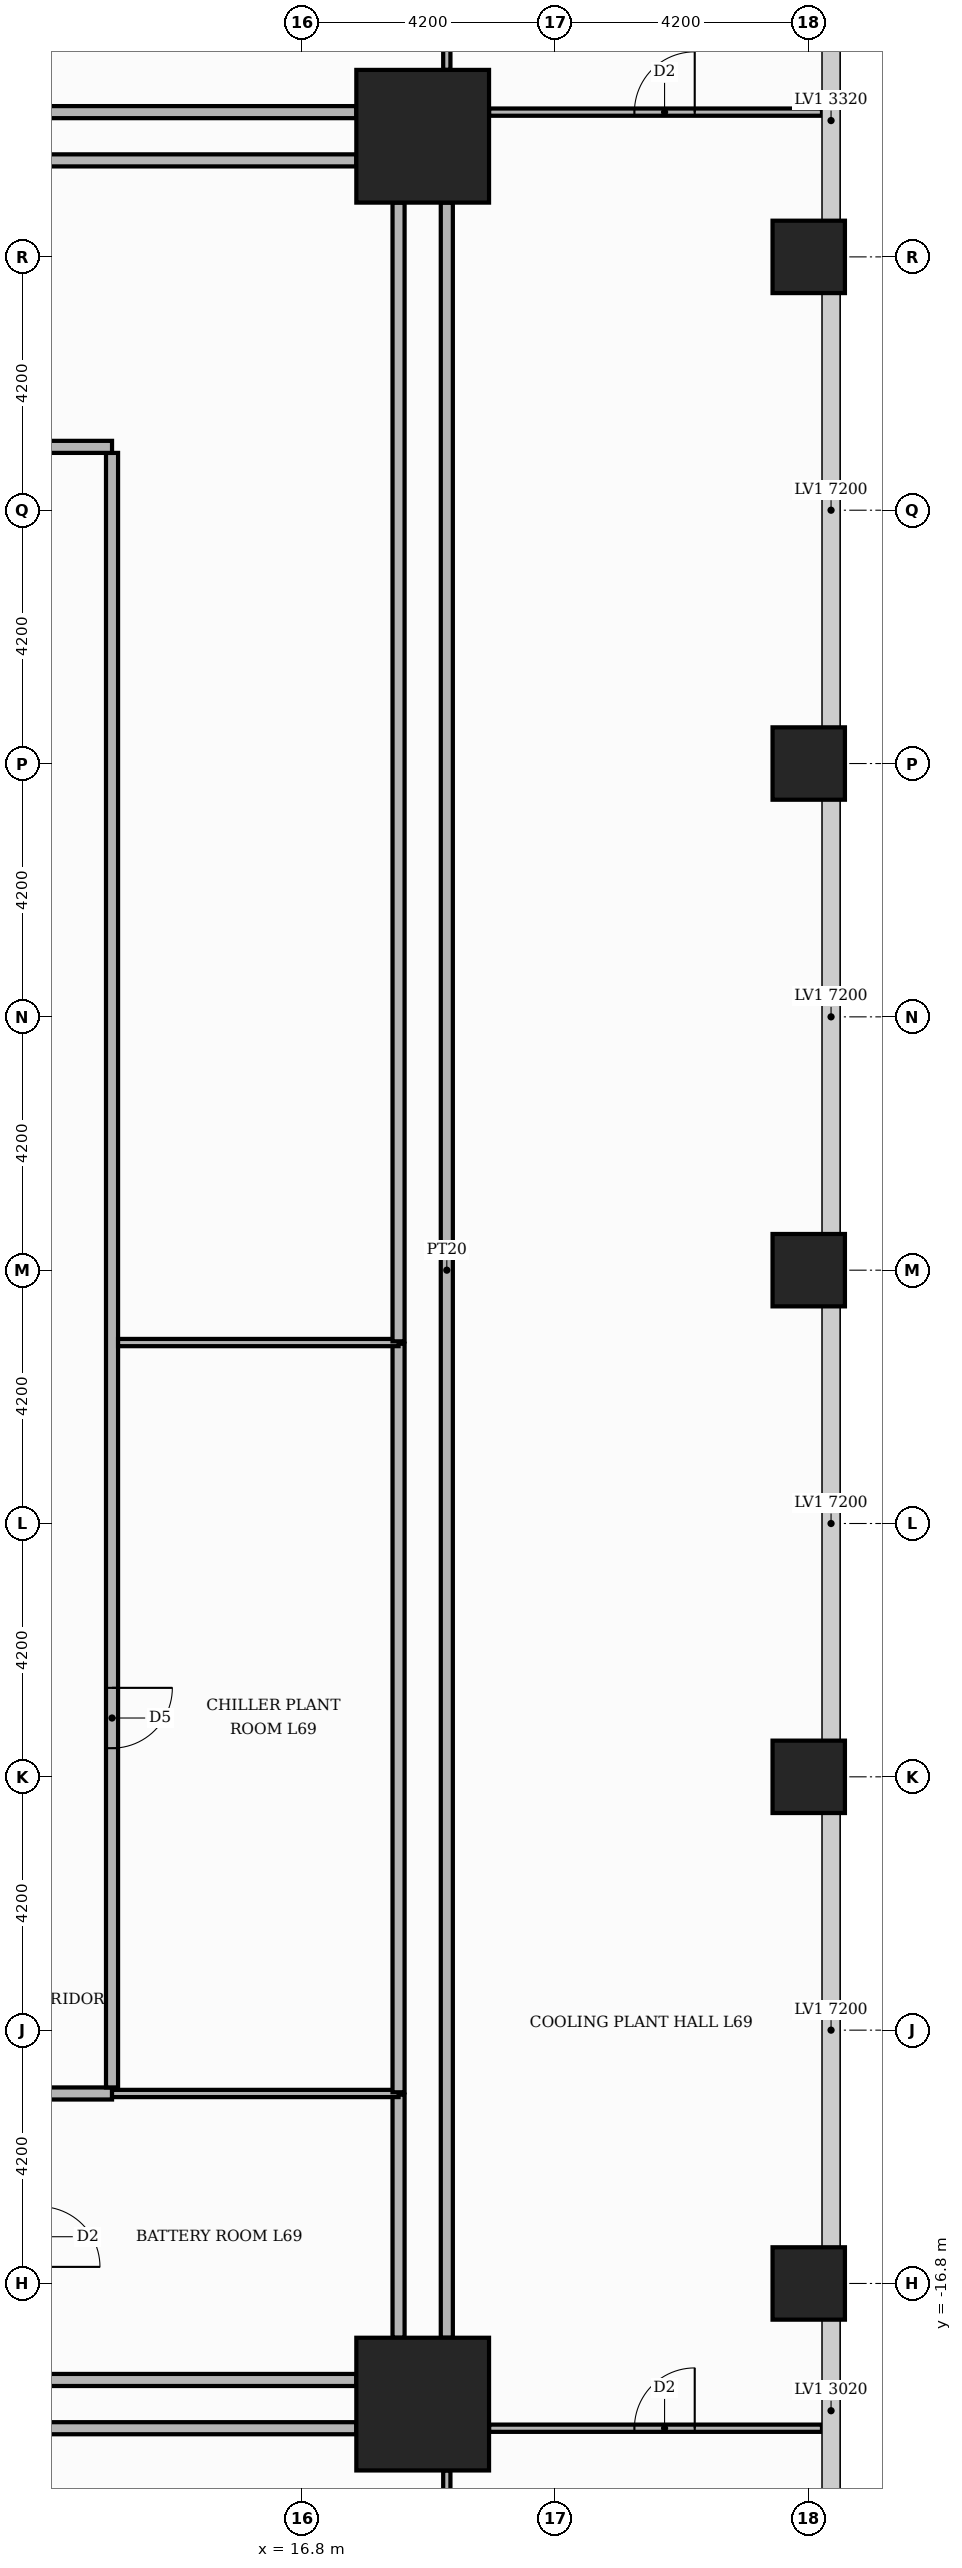
"""IFC4 building model, lengths in metres.
Left out: names, types, materials, properties, quantities, classifications, styles, units other than length and angle.
Written with IfcOpenShell. Run it as: python <this file> out.ifc"""

import sys

from ifc_helpers import new_model, si_unit, direction, frame, frame_2d, origin, origin_2d, place, context, subcontext, project, spatial, rectangle, extrude, element, fill, save


model = new_model("IFC4")
c1 = context("Model", 3, precision=1e-05, world=origin(), true_north=direction((0.0, 1.0)))
c2 = subcontext(c1, "Body", "Model", "MODEL_VIEW")
j1 = project(units=[si_unit("LENGTHUNIT", "METRE"), si_unit("PLANEANGLEUNIT", "RADIAN")], contexts=[c1])
p1 = place(None, origin())
s1 = spatial("IfcSite", under=j1, at=p1, CompositionType="ELEMENT")
p2 = place(p1, origin())
s2 = spatial("IfcBuilding", under=s1, at=p2, CompositionType="ELEMENT")
p3 = place(p2, frame((0.0, 0.0, 287.4)))
s3 = spatial("IfcBuildingStorey", under=s2, at=p3, CompositionType="ELEMENT", Elevation=287.4)
for number, where, z_axis, x_axis in (
    (1, (18.8, 18.8, 0.0), (0.0, 0.0, 1.0), (1.0, 0.0, 0.0)),
    (2, (18.8, -18.8, 0.0), (0.0, 0.0, 1.0), (1.0, 0.0, 0.0)),
):
    element("IfcColumn", number, at=place(p3, frame(where, z_axis=z_axis, x_axis=x_axis)), inside=s3, PredefinedType="COLUMN", context=c2, shape_type="SweptSolid", body=[
        extrude(rectangle(XDim=2.2, YDim=2.2, at=origin_2d()), origin(), (0.0, 0.0, 1.0), 5.4),
    ])
for number, where, z_axis, x_axis in (
    (3, (25.2, 0.0, 0.0), (0.0, 0.0, 1.0), (1.0, 0.0, 0.0)),
    (4, (25.2, 8.4, 0.0), (0.0, 0.0, 1.0), (1.0, 0.0, 0.0)),
    (5, (25.2, 16.8, 0.0), (0.0, 0.0, 1.0), (1.0, 0.0, 0.0)),
    (6, (25.2, -8.4, 0.0), (0.0, 0.0, 1.0), (1.0, 0.0, 0.0)),
    (7, (25.2, -16.8, 0.0), (0.0, 0.0, 1.0), (1.0, 0.0, 0.0)),
):
    element("IfcColumn", number, at=place(p3, frame(where, z_axis=z_axis, x_axis=x_axis)), inside=s3, PredefinedType="COLUMN", context=c2, shape_type="SweptSolid", body=[
        extrude(rectangle(XDim=1.2, YDim=1.2, at=origin_2d()), origin(), (0.0, 0.0, 1.0), 5.4),
    ])
p4 = place(p3, frame((19.2, -25.42, 0.0), z_axis=(0.0, 0.0, 1.0), x_axis=(0.0, 1.0, 0.0)))
e8 = element("IfcWall", 8, at=p4, inside=s3, PredefinedType="PARTITIONING", context=c2, shape_type="SweptSolid", body=[
    extrude(rectangle(XDim=5.52, YDim=0.12, at=frame_2d((2.76, 0.0))), origin(), (0.0, 0.0, 1.0), 5.05),
])
p5 = place(p4, frame((2.11, 0.0, 0.0)))
e9 = element("IfcOpeningElement", 9, at=p5, cuts=e8, PredefinedType="OPENING", context=c2, shape_type="SweptSolid", body=[
    extrude(rectangle(XDim=1.0, YDim=2.1, at=frame_2d((0.5, 1.05))), frame((0.0, 0.07, 0.0), z_axis=(0.0, -1.0, 0.0), x_axis=(1.0, 0.0, 0.0)), (0.0, 0.0, 1.0), 0.14),
])
p6 = place(p3, frame((-17.7, -19.2, 0.0), z_axis=(0.0, 0.0, 1.0), x_axis=(1.0, 0.0, 0.0)))
e10 = element("IfcWall", 10, at=p6, inside=s3, PredefinedType="PARTITIONING", context=c2, shape_type="SweptSolid", body=[
    extrude(rectangle(XDim=35.4, YDim=0.2, at=frame_2d((17.7, 0.0))), origin(), (0.0, 0.0, 1.0), 5.05),
])
p7 = place(p6, frame((17.2, 0.0, 0.0)))
e11 = element("IfcOpeningElement", 11, at=p7, cuts=e10, PredefinedType="OPENING", context=c2, shape_type="SweptSolid", body=[
    extrude(rectangle(XDim=1.0, YDim=2.1, at=frame_2d((0.5, 1.05))), frame((0.0, 0.11, 0.0), z_axis=(0.0, -1.0, 0.0), x_axis=(1.0, 0.0, 0.0)), (0.0, 0.0, 1.0), 0.22),
])
p8 = place(p3, frame((19.9, -19.2, 0.0), z_axis=(0.0, 0.0, 1.0), x_axis=(1.0, 0.0, 0.0)))
e12 = element("IfcWall", 12, at=p8, inside=s3, PredefinedType="PARTITIONING", context=c2, shape_type="SweptSolid", body=[
    extrude(rectangle(XDim=5.52, YDim=0.12, at=frame_2d((2.76, 0.0))), origin(), (0.0, 0.0, 1.0), 5.05),
])
p9 = place(p8, frame((2.41, 0.0, 0.0)))
e13 = element("IfcOpeningElement", 13, at=p9, cuts=e12, PredefinedType="OPENING", context=c2, shape_type="SweptSolid", body=[
    extrude(rectangle(XDim=1.0, YDim=2.1, at=frame_2d((0.5, 1.05))), frame((0.0, 0.07, 0.0), z_axis=(0.0, -1.0, 0.0), x_axis=(1.0, 0.0, 0.0)), (0.0, 0.0, 1.0), 0.14),
])
p10 = place(p3, frame((12.47, -18.4, 0.0), z_axis=(0.0, 0.0, 1.0), x_axis=(1.0, 0.0, 0.0)))
e14 = element("IfcWall", 14, at=p10, inside=s3, PredefinedType="PARTITIONING", context=c2, shape_type="SweptSolid", body=[
    extrude(rectangle(XDim=5.23, YDim=0.2, at=frame_2d((2.615, 0.0))), origin(), (0.0, 0.0, 1.0), 5.05),
])
p11 = place(p3, frame((18.4, -17.7, 0.0), z_axis=(0.0, 0.0, 1.0), x_axis=(0.0, 1.0, 0.0)))
e15 = element("IfcWall", 15, at=p11, inside=s3, PredefinedType="PARTITIONING", context=c2, shape_type="SweptSolid", body=[
    extrude(rectangle(XDim=4.03, YDim=0.2, at=frame_2d((2.015, 0.0))), origin(), (0.0, 0.0, 1.0), 5.05),
])
p12 = place(p3, frame((19.2, -17.7, 0.0), z_axis=(0.0, 0.0, 1.0), x_axis=(0.0, 1.0, 0.0)))
e16 = element("IfcWall", 16, at=p12, inside=s3, PredefinedType="PARTITIONING", context=c2, shape_type="SweptSolid", body=[
    extrude(rectangle(XDim=35.4, YDim=0.2, at=frame_2d((17.7, 0.0))), origin(), (0.0, 0.0, 1.0), 5.05),
])
p13 = place(p3, frame((1.05, -13.65, 0.0), z_axis=(0.0, 0.0, 1.0), x_axis=(1.0, 0.0, 0.0)))
e17 = element("IfcWall", 17, at=p13, inside=s3, PredefinedType="PARTITIONING", context=c2, shape_type="SweptSolid", body=[
    extrude(rectangle(XDim=12.6, YDim=0.2, at=frame_2d((6.3, 0.0))), origin(), (0.0, 0.0, 1.0), 5.05),
])
p14 = place(p3, frame((13.65, -13.65, 0.0), z_axis=(0.0, 0.0, 1.0), x_axis=(1.0, 0.0, 0.0)))
e18 = element("IfcWall", 18, at=p14, inside=s3, PredefinedType="PARTITIONING", context=c2, shape_type="SweptSolid", body=[
    extrude(rectangle(XDim=4.75, YDim=0.12, at=frame_2d((2.375, 0.0))), origin(), (0.0, 0.0, 1.0), 5.05),
])
p15 = place(p3, frame((18.4, -13.63, 0.0), z_axis=(0.0, 0.0, 1.0), x_axis=(0.0, 1.0, 0.0)))
e19 = element("IfcWall", 19, at=p15, inside=s3, PredefinedType="PARTITIONING", context=c2, shape_type="SweptSolid", body=[
    extrude(rectangle(XDim=12.41, YDim=0.2, at=frame_2d((6.205, 0.0))), origin(), (0.0, 0.0, 1.0), 5.05),
])
p16 = place(p3, frame((13.65, -13.55, 0.0), z_axis=(0.0, 0.0, 1.0), x_axis=(0.0, 1.0, 0.0)))
e20 = element("IfcWall", 20, at=p16, inside=s3, PredefinedType="PARTITIONING", context=c2, shape_type="SweptSolid", body=[
    extrude(rectangle(XDim=27.1, YDim=0.2, at=frame_2d((13.55, 0.0))), origin(), (0.0, 0.0, 1.0), 5.05),
])
p17 = place(p16, frame((5.625, 0.0, 0.0)))
e21 = element("IfcOpeningElement", 21, at=p17, cuts=e20, PredefinedType="OPENING", context=c2, shape_type="SweptSolid", body=[
    extrude(rectangle(XDim=1.0, YDim=2.1, at=frame_2d((0.5, 1.05))), frame((0.0, 0.11, 0.0), z_axis=(0.0, -1.0, 0.0), x_axis=(1.0, 0.0, 0.0)), (0.0, 0.0, 1.0), 0.22),
])
p18 = place(p3, frame((13.75, -1.2, 0.0), z_axis=(0.0, 0.0, 1.0), x_axis=(1.0, 0.0, 0.0)))
e22 = element("IfcWall", 22, at=p18, inside=s3, PredefinedType="PARTITIONING", context=c2, shape_type="SweptSolid", body=[
    extrude(rectangle(XDim=4.65, YDim=0.12, at=frame_2d((2.325, 0.0))), origin(), (0.0, 0.0, 1.0), 5.05),
])
p19 = place(p3, frame((18.4, -1.18, 0.0), z_axis=(0.0, 0.0, 1.0), x_axis=(0.0, 1.0, 0.0)))
e23 = element("IfcWall", 23, at=p19, inside=s3, PredefinedType="PARTITIONING", context=c2, shape_type="SweptSolid", body=[
    extrude(rectangle(XDim=18.88, YDim=0.2, at=frame_2d((9.44, 0.0))), origin(), (0.0, 0.0, 1.0), 5.05),
])
p20 = place(p3, frame((-13.65, 13.65, 0.0), z_axis=(0.0, 0.0, 1.0), x_axis=(1.0, 0.0, 0.0)))
e24 = element("IfcWall", 24, at=p20, inside=s3, PredefinedType="PARTITIONING", context=c2, shape_type="SweptSolid", body=[
    extrude(rectangle(XDim=27.3, YDim=0.2, at=frame_2d((13.65, 0.0))), origin(), (0.0, 0.0, 1.0), 5.05),
])
p21 = place(p20, frame((13.05, 0.0, 0.0)))
e25 = element("IfcOpeningElement", 25, at=p21, cuts=e24, PredefinedType="OPENING", context=c2, shape_type="SweptSolid", body=[
    extrude(rectangle(XDim=1.2, YDim=2.1, at=frame_2d((0.6, 1.05))), frame((0.0, 0.11, 0.0), z_axis=(0.0, -1.0, 0.0), x_axis=(1.0, 0.0, 0.0)), (0.0, 0.0, 1.0), 0.22),
])
for number, where, z_axis, x_axis in (
    (26, (-17.7, 18.4, 0.0), (0.0, 0.0, 1.0), (1.0, 0.0, 0.0)),
    (27, (-17.7, 19.2, 0.0), (0.0, 0.0, 1.0), (1.0, 0.0, 0.0)),
):
    element("IfcWall", number, at=place(p3, frame(where, z_axis=z_axis, x_axis=x_axis)), inside=s3, PredefinedType="PARTITIONING", context=c2, shape_type="SweptSolid", body=[
        extrude(rectangle(XDim=35.4, YDim=0.2, at=frame_2d((17.7, 0.0))), origin(), (0.0, 0.0, 1.0), 5.05),
    ])
p22 = place(p3, frame((19.9, 19.2, 0.0), z_axis=(0.0, 0.0, 1.0), x_axis=(1.0, 0.0, 0.0)))
e28 = element("IfcWall", 28, at=p22, inside=s3, PredefinedType="PARTITIONING", context=c2, shape_type="SweptSolid", body=[
    extrude(rectangle(XDim=5.52, YDim=0.12, at=frame_2d((2.76, 0.0))), origin(), (0.0, 0.0, 1.0), 5.05),
])
p23 = place(p22, frame((2.41, 0.0, 0.0)))
e29 = element("IfcOpeningElement", 29, at=p23, cuts=e28, PredefinedType="OPENING", context=c2, shape_type="SweptSolid", body=[
    extrude(rectangle(XDim=1.0, YDim=2.1, at=frame_2d((0.5, 1.05))), frame((0.0, 0.07, 0.0), z_axis=(0.0, -1.0, 0.0), x_axis=(1.0, 0.0, 0.0)), (0.0, 0.0, 1.0), 0.14),
])
p24 = place(p3, frame((19.2, 19.9, 0.0), z_axis=(0.0, 0.0, 1.0), x_axis=(0.0, 1.0, 0.0)))
e30 = element("IfcWall", 30, at=p24, inside=s3, PredefinedType="PARTITIONING", context=c2, shape_type="SweptSolid", body=[
    extrude(rectangle(XDim=5.52, YDim=0.12, at=frame_2d((2.76, 0.0))), origin(), (0.0, 0.0, 1.0), 5.05),
])
p25 = place(p24, frame((2.41, 0.0, 0.0)))
e31 = element("IfcOpeningElement", 31, at=p25, cuts=e30, PredefinedType="OPENING", context=c2, shape_type="SweptSolid", body=[
    extrude(rectangle(XDim=1.0, YDim=2.1, at=frame_2d((0.5, 1.05))), frame((0.0, 0.07, 0.0), z_axis=(0.0, -1.0, 0.0), x_axis=(1.0, 0.0, 0.0)), (0.0, 0.0, 1.0), 0.14),
])
p26 = place(p17, frame((1.0, 0.0, 0.0), z_axis=(0.0, 0.0, 1.0), x_axis=(-1.0, 0.0, 0.0)))
e32 = element("IfcDoor", 32, at=p26, inside=s3, OperationType="SINGLE_SWING_RIGHT", PredefinedType="DOOR", context=c2, shape_type="SweptSolid", body=[
    extrude(rectangle(XDim=1.0, YDim=2.1, at=frame_2d((0.5, 1.05))), frame((0.0, 0.025, 0.0), z_axis=(0.0, -1.0, 0.0), x_axis=(1.0, 0.0, 0.0)), (0.0, 0.0, 1.0), 0.05),
])
fill(e21, e32)
p27 = place(p9, origin())
e33 = element("IfcDoor", 33, at=p27, inside=s3, OperationType="SINGLE_SWING_RIGHT", PredefinedType="DOOR", context=c2, shape_type="SweptSolid", body=[
    extrude(rectangle(XDim=1.0, YDim=2.1, at=frame_2d((0.5, 1.05))), frame((0.0, 0.025, 0.0), z_axis=(0.0, -1.0, 0.0), x_axis=(1.0, 0.0, 0.0)), (0.0, 0.0, 1.0), 0.05),
])
fill(e13, e33)
p28 = place(p23, origin())
e34 = element("IfcDoor", 34, at=p28, inside=s3, OperationType="SINGLE_SWING_RIGHT", PredefinedType="DOOR", context=c2, shape_type="SweptSolid", body=[
    extrude(rectangle(XDim=1.0, YDim=2.1, at=frame_2d((0.5, 1.05))), frame((0.0, 0.025, 0.0), z_axis=(0.0, -1.0, 0.0), x_axis=(1.0, 0.0, 0.0)), (0.0, 0.0, 1.0), 0.05),
])
fill(e29, e34)
save(model, sys.argv[1])
